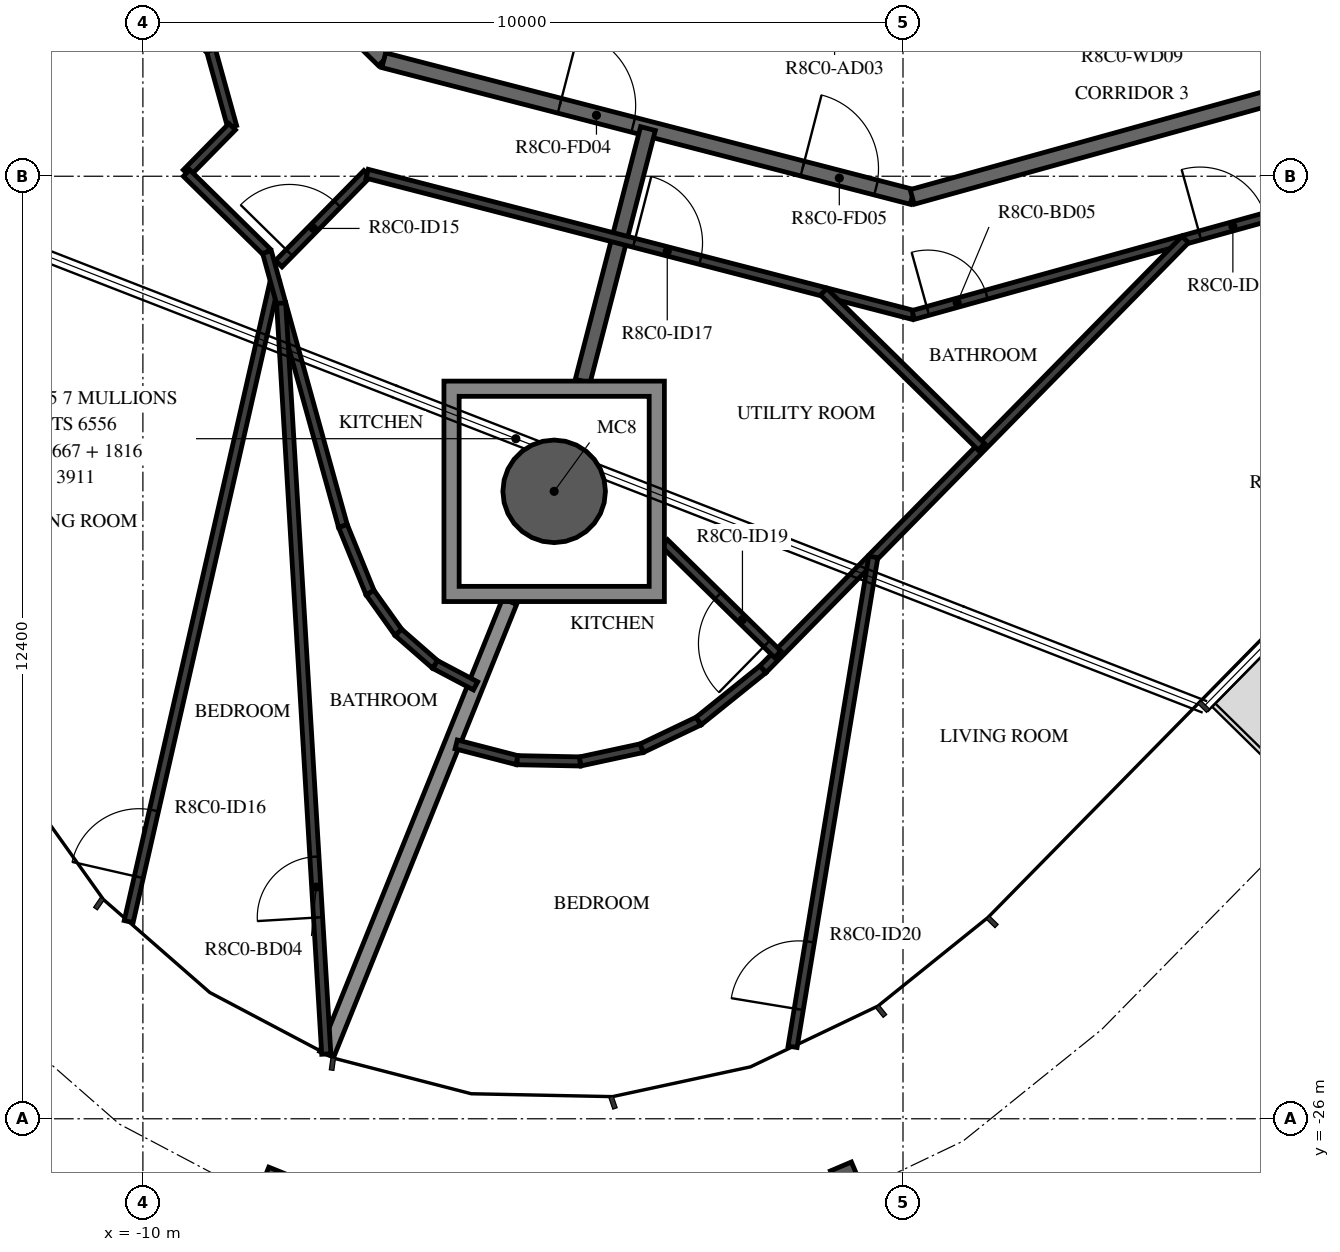
"""IFC4 building model, lengths in metres.
Left out: names, types, materials, properties, quantities, classifications, styles, units other than length and angle.
Written with IfcOpenShell. Run it as: python <this file> out.ifc"""

import sys

from ifc_helpers import new_model, si_unit, direction, frame, frame_2d, origin, origin_2d, place, context, subcontext, project, spatial, polyline, rectangle, hollow_circle, i_section, outline, extrude, element, fill, save


model = new_model("IFC4")
c1 = context("Model", 3, precision=1e-05, world=origin(), true_north=direction((0.0, 1.0)))
c2 = subcontext(c1, "Body", "Model", "MODEL_VIEW")
j1 = project(units=[si_unit("LENGTHUNIT", "METRE"), si_unit("PLANEANGLEUNIT", "RADIAN")], contexts=[c1])
p1 = place(None, origin())
s1 = spatial("IfcSite", under=j1, at=p1, CompositionType="ELEMENT")
p2 = place(p1, origin())
s2 = spatial("IfcBuilding", under=s1, at=p2, CompositionType="ELEMENT")
p3 = place(p2, frame((0.0, 0.0, 319.2)))
s3 = spatial("IfcBuildingStorey", under=s2, at=p3, CompositionType="ELEMENT", Elevation=319.2)
p4 = place(p3, frame((-4.589, -17.745, -0.38), z_axis=(0.0, 0.0, 1.0), x_axis=(1.0, 0.0, 0.0)))
e1 = element("IfcColumn", 1, at=p4, inside=s3, PredefinedType="COLUMN", context=c2, shape_type="SweptSolid", body=[
    extrude(hollow_circle(Radius=0.675, WallThickness=0.03, at=origin_2d()), origin(), (0.0, 0.0, 1.0), 3.5),
])
for number, where, z_axis, x_axis in (
    (2, (-8.373, -27.11, -0.38), (0.0, 0.0, 1.0), (-0.927, 0.375, 0.0)),
    (3, (-0.641, -27.042, -0.38), (0.0, 0.0, 1.0), (-0.92, -0.391, 0.0)),
):
    element("IfcColumn", number, at=place(p3, frame(where, z_axis=z_axis, x_axis=x_axis)), inside=s3, PredefinedType="COLUMN", context=c2, shape_type="SweptSolid", body=[
        extrude(i_section(OverallWidth=0.3, OverallDepth=0.9, WebThickness=0.019, FlangeThickness=0.035, FilletRadius=0.03, at=origin_2d()), origin(), (0.0, 0.0, 1.0), 3.5),
    ])
p5 = place(p3, frame((-11.953, -7.041, 0.0), z_axis=(0.0, 0.0, 1.0), x_axis=(0.713250549143, -0.70090916255, 0.0)))
e4 = element("IfcWall", 4, at=p5, inside=s3, PredefinedType="STANDARD", context=c2, shape_type="SweptSolid", body=[
    extrude(rectangle(XDim=7.181, YDim=0.2, at=frame_2d((3.59, 0.0))), origin(), (0.0, 0.0, 1.0), 3.12),
])
p6 = place(p3, frame((-6.831, -12.074, 0.0), z_axis=(0.0, 0.0, 1.0), x_axis=(0.968144780225, -0.250391063186, 0.0)))
e5 = element("IfcWall", 5, at=p6, inside=s3, PredefinedType="STANDARD", context=c2, shape_type="SweptSolid", body=[
    extrude(rectangle(XDim=7.181, YDim=0.2, at=frame_2d((3.591, 0.0))), origin(), (0.0, 0.0, 1.0), 3.12),
])
p7 = place(p6, frame((2.39, 0.0, 0.0)))
e6 = element("IfcOpeningElement", 6, at=p7, cuts=e5, PredefinedType="OPENING", context=c2, shape_type="SweptSolid", body=[
    extrude(rectangle(XDim=1.0, YDim=2.1, at=frame_2d((0.5, 1.05))), frame((0.0, 0.11, 0.0), z_axis=(0.0, -1.0, 0.0), x_axis=(1.0, 0.0, 0.0)), (0.0, 0.0, 1.0), 0.22),
])
p8 = place(p6, frame((5.69, 0.0, 0.0)))
e7 = element("IfcOpeningElement", 7, at=p8, cuts=e5, PredefinedType="OPENING", context=c2, shape_type="SweptSolid", body=[
    extrude(rectangle(XDim=1.0, YDim=2.1, at=frame_2d((0.5, 1.05))), frame((0.0, 0.11, 0.0), z_axis=(0.0, -1.0, 0.0), x_axis=(1.0, 0.0, 0.0)), (0.0, 0.0, 1.0), 0.22),
])
p9 = place(p3, frame((0.121, -13.872, 0.0), z_axis=(0.0, 0.0, 1.0), x_axis=(0.963625960674, 0.267254575108, 0.0)))
e8 = element("IfcWall", 8, at=p9, inside=s3, PredefinedType="STANDARD", context=c2, shape_type="SweptSolid", body=[
    extrude(rectangle(XDim=7.181, YDim=0.2, at=frame_2d((3.591, 0.0))), origin(), (0.0, 0.0, 1.0), 3.12),
])
p10 = place(p3, frame((-4.214, -16.295, 0.0), z_axis=(0.0, 0.0, 1.0), x_axis=(0.250428810918, 0.968135016752, 0.0)))
e9 = element("IfcWall", 9, at=p10, inside=s3, PredefinedType="STANDARD", context=c2, shape_type="SweptSolid", body=[
    extrude(rectangle(XDim=3.432, YDim=0.2, at=frame_2d((1.716, 0.0))), origin(), (0.0, 0.0, 1.0), 3.12),
])
p11 = place(p3, frame((-7.582, -25.151, 0.0), z_axis=(0.0, 0.0, 1.0), x_axis=(0.374645287615, 0.927168220156, 0.0)))
e10 = element("IfcWall", 10, at=p11, inside=s3, PredefinedType="STANDARD", context=c2, shape_type="SweptSolid", body=[
    extrude(rectangle(XDim=6.423, YDim=0.2, at=frame_2d((3.212, 0.0))), origin(), (0.0, 0.0, 1.0), 2.73),
])
p12 = place(p3, frame((-13.291, -7.829, 0.0), z_axis=(0.0, 0.0, 1.0), x_axis=(0.713255094589, -0.700904537039, 0.0)))
e11 = element("IfcWall", 11, at=p12, inside=s3, PredefinedType="PARTITIONING", context=c2, shape_type="SweptSolid", body=[
    extrude(rectangle(XDim=5.871, YDim=0.12, at=frame_2d((2.936, 0.0))), origin(), (0.0, 0.0, 1.0), 3.12),
])
p13 = place(p12, frame((3.627, 0.0, 0.0)))
e12 = element("IfcOpeningElement", 12, at=p13, cuts=e11, PredefinedType="OPENING", context=c2, shape_type="SweptSolid", body=[
    extrude(rectangle(XDim=0.9, YDim=2.1, at=frame_2d((0.45, 1.05))), frame((0.0, 0.07, 0.0), z_axis=(0.0, -1.0, 0.0), x_axis=(1.0, 0.0, 0.0)), (0.0, 0.0, 1.0), 0.14),
])
p14 = place(p3, frame((-9.104, -11.944, 0.0), z_axis=(0.0, 0.0, 1.0), x_axis=(0.267317596771, -0.963608479859, 0.0)))
e13 = element("IfcWall", 13, at=p14, inside=s3, PredefinedType="PARTITIONING", context=c2, shape_type="SweptSolid", body=[
    extrude(rectangle(XDim=1.042, YDim=0.12, at=frame_2d((0.521, 0.0))), origin(), (0.0, 0.0, 1.0), 3.12),
])
p15 = place(p3, frame((-8.825, -12.948, 0.0), z_axis=(0.0, 0.0, 1.0), x_axis=(-0.700949034431, -0.713211364976, 0.0)))
e14 = element("IfcWall", 14, at=p15, inside=s3, PredefinedType="PARTITIONING", context=c2, shape_type="SweptSolid", body=[
    extrude(rectangle(XDim=0.856, YDim=0.12, at=frame_2d((0.428, 0.0))), origin(), (0.0, 0.0, 1.0), 3.12),
])
p16 = place(p3, frame((-9.425, -13.559, 0.0), z_axis=(0.0, 0.0, 1.0), x_axis=(0.713255540994, -0.700904082768, 0.0)))
e15 = element("IfcWall", 15, at=p16, inside=s3, PredefinedType="PARTITIONING", context=c2, shape_type="SweptSolid", body=[
    extrude(rectangle(XDim=1.482, YDim=0.12, at=frame_2d((0.741, 0.0))), origin(), (0.0, 0.0, 1.0), 3.12),
])
p17 = place(p3, frame((-8.213, -14.75, 0.0), z_axis=(0.0, 0.0, 1.0), x_axis=(0.700899260151, 0.713260280066, 0.0)))
e16 = element("IfcWall", 16, at=p17, inside=s3, PredefinedType="PARTITIONING", context=c2, shape_type="SweptSolid", body=[
    extrude(rectangle(XDim=1.659, YDim=0.12, at=frame_2d((0.83, 0.0))), origin(), (0.0, 0.0, 1.0), 3.12),
])
p18 = place(p17, frame((0.2, 0.0, 0.0)))
e17 = element("IfcOpeningElement", 17, at=p18, cuts=e16, PredefinedType="OPENING", context=c2, shape_type="SweptSolid", body=[
    extrude(rectangle(XDim=0.9, YDim=2.1, at=frame_2d((0.45, 1.05))), frame((0.0, 0.07, 0.0), z_axis=(0.0, -1.0, 0.0), x_axis=(1.0, 0.0, 0.0)), (0.0, 0.0, 1.0), 0.14),
])
p19 = place(p3, frame((-7.05, -13.567, 0.0), z_axis=(0.0, 0.0, 1.0), x_axis=(0.968142373865, -0.250400367264, 0.0)))
e18 = element("IfcWall", 18, at=p19, inside=s3, PredefinedType="PARTITIONING", context=c2, shape_type="SweptSolid", body=[
    extrude(rectangle(XDim=7.421, YDim=0.12, at=frame_2d((3.71, 0.0))), origin(), (0.0, 0.0, 1.0), 3.12),
])
p20 = place(p19, frame((3.628, 0.0, 0.0)))
e19 = element("IfcOpeningElement", 19, at=p20, cuts=e18, PredefinedType="OPENING", context=c2, shape_type="SweptSolid", body=[
    extrude(rectangle(XDim=0.9, YDim=2.1, at=frame_2d((0.45, 1.05))), frame((0.0, 0.07, 0.0), z_axis=(0.0, -1.0, 0.0), x_axis=(1.0, 0.0, 0.0)), (0.0, 0.0, 1.0), 0.14),
])
p21 = place(p3, frame((-14.066, -13.508, 0.0), z_axis=(0.0, 0.0, 1.0), x_axis=(0.700941781432, 0.7132184932, 0.0)))
e20 = element("IfcWall", 20, at=p21, inside=s3, PredefinedType="PARTITIONING", context=c2, shape_type="SweptSolid", body=[
    extrude(rectangle(XDim=4.594, YDim=0.12, at=frame_2d((2.297, 0.0))), origin(), (0.0, 0.0, 1.0), 3.12),
])
p22 = place(p3, frame((-10.187, -23.406, 0.0), z_axis=(0.0, 0.0, 1.0), x_axis=(0.222411648081, 0.974952849526, 0.0)))
e21 = element("IfcWall", 21, at=p22, inside=s3, PredefinedType="PARTITIONING", context=c2, shape_type="SweptSolid", body=[
    extrude(rectangle(XDim=8.649, YDim=0.12, at=frame_2d((4.324, 0.0))), origin(), (0.0, 0.0, 1.0), 3.12),
])
p23 = place(p22, frame((0.6, 0.0, 0.0)))
e22 = element("IfcOpeningElement", 22, at=p23, cuts=e21, PredefinedType="OPENING", context=c2, shape_type="SweptSolid", body=[
    extrude(rectangle(XDim=0.9, YDim=2.1, at=frame_2d((0.45, 1.05))), frame((0.0, 0.07, 0.0), z_axis=(0.0, -1.0, 0.0), x_axis=(1.0, 0.0, 0.0)), (0.0, 0.0, 1.0), 0.14),
])
p24 = place(p3, frame((-7.368, -18.202, 0.0), z_axis=(0.0, 0.0, 1.0), x_axis=(-0.267246564077, 0.963628182438, 0.0)))
e23 = element("IfcWall", 23, at=p24, inside=s3, PredefinedType="PARTITIONING", context=c2, shape_type="SweptSolid", body=[
    extrude(rectangle(XDim=3.74, YDim=0.12, at=frame_2d((1.87, 0.0))), origin(), (0.0, 0.0, 1.0), 3.12),
])
p25 = place(p3, frame((-7.587, -25.148, 0.0), z_axis=(0.0, 0.0, 1.0), x_axis=(-0.060023558623, 0.99819696073, 0.0)))
e24 = element("IfcWall", 24, at=p25, inside=s3, PredefinedType="PARTITIONING", context=c2, shape_type="SweptSolid", body=[
    extrude(rectangle(XDim=9.896, YDim=0.12, at=frame_2d((4.948, 0.0))), origin(), (0.0, 0.0, 1.0), 3.12),
])
p26 = place(p25, frame((1.8, 0.0, 0.0)))
e25 = element("IfcOpeningElement", 25, at=p26, cuts=e24, PredefinedType="OPENING", context=c2, shape_type="SweptSolid", body=[
    extrude(rectangle(XDim=0.8, YDim=2.1, at=frame_2d((0.4, 1.05))), frame((0.0, 0.07, 0.0), z_axis=(0.0, -1.0, 0.0), x_axis=(1.0, 0.0, 0.0)), (0.0, 0.0, 1.0), 0.14),
])
p27 = place(p3, frame((-7.368, -18.202, 0.0), z_axis=(0.0, 0.0, 1.0), x_axis=(0.377296887314, -0.92609235977, 0.0)))
e26 = element("IfcWall", 26, at=p27, inside=s3, PredefinedType="PARTITIONING", context=c2, shape_type="SweptSolid", body=[
    extrude(rectangle(XDim=0.947, YDim=0.12, at=frame_2d((0.473, 0.0))), origin(), (0.0, 0.0, 1.0), 3.12),
])
p28 = place(p3, frame((-7.011, -19.079, 0.0), z_axis=(0.0, 0.0, 1.0), x_axis=(0.580662514246, -0.814144363458, 0.0)))
e27 = element("IfcWall", 27, at=p28, inside=s3, PredefinedType="PARTITIONING", context=c2, shape_type="SweptSolid", body=[
    extrude(rectangle(XDim=0.642, YDim=0.12, at=frame_2d((0.321, 0.0))), origin(), (0.0, 0.0, 1.0), 3.12),
])
p29 = place(p3, frame((-6.638, -19.601, 0.0), z_axis=(0.0, 0.0, 1.0), x_axis=(0.753047703781, -0.657965923001, 0.0)))
e28 = element("IfcWall", 28, at=p29, inside=s3, PredefinedType="PARTITIONING", context=c2, shape_type="SweptSolid", body=[
    extrude(rectangle(XDim=0.642, YDim=0.12, at=frame_2d((0.321, 0.0))), origin(), (0.0, 0.0, 1.0), 3.12),
])
p30 = place(p3, frame((-6.155, -20.024, 0.0), z_axis=(0.0, 0.0, 1.0), x_axis=(0.884133271246, -0.467234800369, 0.0)))
e29 = element("IfcWall", 29, at=p30, inside=s3, PredefinedType="PARTITIONING", context=c2, shape_type="SweptSolid", body=[
    extrude(rectangle(XDim=0.601, YDim=0.12, at=frame_2d((0.301, 0.0))), origin(), (0.0, 0.0, 1.0), 3.12),
])
p31 = place(p3, frame((0.135, -15.425, 0.0), z_axis=(0.0, 0.0, 1.0), x_axis=(0.963633899075, 0.267225950373, 0.0)))
e30 = element("IfcWall", 30, at=p31, inside=s3, PredefinedType="PARTITIONING", context=c2, shape_type="SweptSolid", body=[
    extrude(rectangle(XDim=7.985, YDim=0.12, at=frame_2d((3.992, 0.0))), origin(), (0.0, 0.0, 1.0), 3.12),
])
p32 = place(p31, frame((0.2, 0.0, 0.0)))
e31 = element("IfcOpeningElement", 31, at=p32, cuts=e30, PredefinedType="OPENING", context=c2, shape_type="SweptSolid", body=[
    extrude(rectangle(XDim=0.8, YDim=2.1, at=frame_2d((0.4, 1.05))), frame((0.0, 0.07, 0.0), z_axis=(0.0, -1.0, 0.0), x_axis=(1.0, 0.0, 0.0)), (0.0, 0.0, 1.0), 0.14),
])
p33 = place(p31, frame((3.914, 0.0, 0.0)))
e32 = element("IfcOpeningElement", 32, at=p33, cuts=e30, PredefinedType="OPENING", context=c2, shape_type="SweptSolid", body=[
    extrude(rectangle(XDim=0.9, YDim=2.1, at=frame_2d((0.45, 1.05))), frame((0.0, 0.07, 0.0), z_axis=(0.0, -1.0, 0.0), x_axis=(1.0, 0.0, 0.0)), (0.0, 0.0, 1.0), 0.14),
])
p34 = place(p3, frame((-5.878, -21.075, 0.0), z_axis=(0.0, 0.0, 1.0), x_axis=(0.968171520146, -0.250287649673, 0.0)))
e33 = element("IfcWall", 33, at=p34, inside=s3, PredefinedType="PARTITIONING", context=c2, shape_type="SweptSolid", body=[
    extrude(rectangle(XDim=0.829, YDim=0.12, at=frame_2d((0.415, 0.0))), origin(), (0.0, 0.0, 1.0), 3.12),
])
for number, where, z_axis, x_axis in (
    (34, (-5.076, -21.282, 0.0), (0.0, 0.0, 1.0), (1.0, -0.02, 0.0)),
    (35, (-4.247, -21.299, 0.0), (0.0, 0.0, 1.0), (0.978, 0.211, 0.0)),
):
    element("IfcWall", number, at=place(p3, frame(where, z_axis=z_axis, x_axis=x_axis)), inside=s3, PredefinedType="PARTITIONING", context=c2, shape_type="SweptSolid", body=[
        extrude(rectangle(XDim=0.829, YDim=0.12, at=frame_2d((0.415, 0.0))), origin(), (0.0, 0.0, 1.0), 3.12),
    ])
p35 = place(p3, frame((-3.437, -21.124, 0.0), z_axis=(0.0, 0.0, 1.0), x_axis=(0.902637137035, 0.430402368541, 0.0)))
e36 = element("IfcWall", 36, at=p35, inside=s3, PredefinedType="PARTITIONING", context=c2, shape_type="SweptSolid", body=[
    extrude(rectangle(XDim=0.829, YDim=0.12, at=frame_2d((0.414, 0.0))), origin(), (0.0, 0.0, 1.0), 3.12),
])
p36 = place(p3, frame((-2.689, -20.768, 0.0), z_axis=(0.0, 0.0, 1.0), x_axis=(0.778936756675, 0.627102486919, 0.0)))
e37 = element("IfcWall", 37, at=p36, inside=s3, PredefinedType="PARTITIONING", context=c2, shape_type="SweptSolid", body=[
    extrude(rectangle(XDim=1.087, YDim=0.12, at=frame_2d((0.543, 0.0))), origin(), (0.0, 0.0, 1.0), 3.12),
])
p37 = place(p3, frame((-1.842, -20.086, 0.0), z_axis=(0.0, 0.0, 1.0), x_axis=(0.700919640212, 0.713240252625, 0.0)))
e38 = element("IfcWall", 38, at=p37, inside=s3, PredefinedType="PARTITIONING", context=c2, shape_type="SweptSolid", body=[
    extrude(rectangle(XDim=7.926, YDim=0.12, at=frame_2d((3.963, 0.0))), origin(), (0.0, 0.0, 1.0), 3.12),
])
p38 = place(p3, frame((-1.649, -19.889, 0.0), z_axis=(0.0, 0.0, 1.0), x_axis=(-0.713270858454, 0.700888495041, 0.0)))
e39 = element("IfcWall", 39, at=p38, inside=s3, PredefinedType="PARTITIONING", context=c2, shape_type="SweptSolid", body=[
    extrude(rectangle(XDim=2.09, YDim=0.12, at=frame_2d((1.045, 0.0))), origin(), (0.0, 0.0, 1.0), 3.12),
])
p39 = place(p38, frame((0.2, 0.0, 0.0)))
e40 = element("IfcOpeningElement", 40, at=p39, cuts=e39, PredefinedType="OPENING", context=c2, shape_type="SweptSolid", body=[
    extrude(rectangle(XDim=0.9, YDim=2.1, at=frame_2d((0.45, 1.05))), frame((0.0, 0.07, 0.0), z_axis=(0.0, -1.0, 0.0), x_axis=(1.0, 0.0, 0.0)), (0.0, 0.0, 1.0), 0.14),
])
p40 = place(p3, frame((-1.453, -25.053, 0.0), z_axis=(0.0, 0.0, 1.0), x_axis=(0.162683241952, 0.986678348191, 0.0)))
e41 = element("IfcWall", 41, at=p40, inside=s3, PredefinedType="PARTITIONING", context=c2, shape_type="SweptSolid", body=[
    extrude(rectangle(XDim=6.531, YDim=0.12, at=frame_2d((3.266, 0.0))), origin(), (0.0, 0.0, 1.0), 3.12),
])
p41 = place(p40, frame((0.5, 0.0, 0.0)))
e42 = element("IfcOpeningElement", 42, at=p41, cuts=e41, PredefinedType="OPENING", context=c2, shape_type="SweptSolid", body=[
    extrude(rectangle(XDim=0.9, YDim=2.1, at=frame_2d((0.45, 1.05))), frame((0.0, 0.07, 0.0), z_axis=(0.0, -1.0, 0.0), x_axis=(1.0, 0.0, 0.0)), (0.0, 0.0, 1.0), 0.14),
])
p42 = place(p3, frame((1.032, -17.161, 0.0), z_axis=(0.0, 0.0, 1.0), x_axis=(-0.713201827259, 0.700958738867, 0.0)))
e43 = element("IfcWall", 43, at=p42, inside=s3, PredefinedType="PARTITIONING", context=c2, shape_type="SweptSolid", body=[
    extrude(rectangle(XDim=2.911, YDim=0.12, at=frame_2d((1.456, 0.0))), origin(), (0.0, 0.0, 1.0), 3.12),
])
p43 = place(p3, origin())
e44 = element("IfcWall", 44, at=p43, inside=s3, PredefinedType="STANDARD", context=c2, shape_type="SweptSolid", body=[
    extrude(outline(polyline([(-3.139, -16.295), (-3.139, -19.195), (-6.039, -19.195), (-6.039, -16.295), (-3.139, -16.295)]), holes=[polyline([(-5.839, -18.995), (-3.339, -18.995), (-3.339, -16.495), (-5.839, -16.495), (-5.839, -18.995)])]), origin(), (0.0, 0.0, 1.0), 3.12),
])
p44 = place(p7, origin())
e45 = element("IfcDoor", 45, at=p44, inside=s3, OperationType="SINGLE_SWING_RIGHT", PredefinedType="DOOR", context=c2, shape_type="SweptSolid", body=[
    extrude(rectangle(XDim=1.0, YDim=2.1, at=frame_2d((0.5, 1.05))), frame((0.0, 0.025, 0.0), z_axis=(0.0, -1.0, 0.0), x_axis=(1.0, 0.0, 0.0)), (0.0, 0.0, 1.0), 0.05),
])
fill(e6, e45)
p45 = place(p18, origin())
e46 = element("IfcDoor", 46, at=p45, inside=s3, OperationType="SINGLE_SWING_LEFT", PredefinedType="DOOR", context=c2, shape_type="SweptSolid", body=[
    extrude(rectangle(XDim=0.9, YDim=2.1, at=frame_2d((0.45, 1.05))), frame((0.0, 0.025, 0.0), z_axis=(0.0, -1.0, 0.0), x_axis=(1.0, 0.0, 0.0)), (0.0, 0.0, 1.0), 0.05),
])
fill(e17, e46)
p46 = place(p23, origin())
e47 = element("IfcDoor", 47, at=p46, inside=s3, OperationType="SINGLE_SWING_RIGHT", PredefinedType="DOOR", context=c2, shape_type="SweptSolid", body=[
    extrude(rectangle(XDim=0.9, YDim=2.1, at=frame_2d((0.45, 1.05))), frame((0.0, 0.025, 0.0), z_axis=(0.0, -1.0, 0.0), x_axis=(1.0, 0.0, 0.0)), (0.0, 0.0, 1.0), 0.05),
])
fill(e22, e47)
p47 = place(p26, origin())
e48 = element("IfcDoor", 48, at=p47, inside=s3, OperationType="SINGLE_SWING_RIGHT", PredefinedType="DOOR", context=c2, shape_type="SweptSolid", body=[
    extrude(rectangle(XDim=0.8, YDim=2.1, at=frame_2d((0.4, 1.05))), frame((0.0, 0.025, 0.0), z_axis=(0.0, -1.0, 0.0), x_axis=(1.0, 0.0, 0.0)), (0.0, 0.0, 1.0), 0.05),
])
fill(e25, e48)
p48 = place(p8, origin())
e49 = element("IfcDoor", 49, at=p48, inside=s3, OperationType="SINGLE_SWING_LEFT", PredefinedType="DOOR", context=c2, shape_type="SweptSolid", body=[
    extrude(rectangle(XDim=1.0, YDim=2.1, at=frame_2d((0.5, 1.05))), frame((0.0, 0.025, 0.0), z_axis=(0.0, -1.0, 0.0), x_axis=(1.0, 0.0, 0.0)), (0.0, 0.0, 1.0), 0.05),
])
fill(e7, e49)
p49 = place(p20, origin())
e50 = element("IfcDoor", 50, at=p49, inside=s3, OperationType="SINGLE_SWING_RIGHT", PredefinedType="DOOR", context=c2, shape_type="SweptSolid", body=[
    extrude(rectangle(XDim=0.9, YDim=2.1, at=frame_2d((0.45, 1.05))), frame((0.0, 0.025, 0.0), z_axis=(0.0, -1.0, 0.0), x_axis=(1.0, 0.0, 0.0)), (0.0, 0.0, 1.0), 0.05),
])
fill(e19, e50)
p50 = place(p32, origin())
e51 = element("IfcDoor", 51, at=p50, inside=s3, OperationType="SINGLE_SWING_LEFT", PredefinedType="DOOR", context=c2, shape_type="SweptSolid", body=[
    extrude(rectangle(XDim=0.8, YDim=2.1, at=frame_2d((0.4, 1.05))), frame((0.0, 0.025, 0.0), z_axis=(0.0, -1.0, 0.0), x_axis=(1.0, 0.0, 0.0)), (0.0, 0.0, 1.0), 0.05),
])
fill(e31, e51)
p51 = place(p33, origin())
e52 = element("IfcDoor", 52, at=p51, inside=s3, OperationType="SINGLE_SWING_LEFT", PredefinedType="DOOR", context=c2, shape_type="SweptSolid", body=[
    extrude(rectangle(XDim=0.9, YDim=2.1, at=frame_2d((0.45, 1.05))), frame((0.0, 0.025, 0.0), z_axis=(0.0, -1.0, 0.0), x_axis=(1.0, 0.0, 0.0)), (0.0, 0.0, 1.0), 0.05),
])
fill(e32, e52)
p52 = place(p39, origin())
e53 = element("IfcDoor", 53, at=p52, inside=s3, OperationType="SINGLE_SWING_LEFT", PredefinedType="DOOR", context=c2, shape_type="SweptSolid", body=[
    extrude(rectangle(XDim=0.9, YDim=2.1, at=frame_2d((0.45, 1.05))), frame((0.0, 0.025, 0.0), z_axis=(0.0, -1.0, 0.0), x_axis=(1.0, 0.0, 0.0)), (0.0, 0.0, 1.0), 0.05),
])
fill(e40, e53)
p53 = place(p41, origin())
e54 = element("IfcDoor", 54, at=p53, inside=s3, OperationType="SINGLE_SWING_LEFT", PredefinedType="DOOR", context=c2, shape_type="SweptSolid", body=[
    extrude(rectangle(XDim=0.9, YDim=2.1, at=frame_2d((0.45, 1.05))), frame((0.0, 0.025, 0.0), z_axis=(0.0, -1.0, 0.0), x_axis=(1.0, 0.0, 0.0)), (0.0, 0.0, 1.0), 0.05),
])
fill(e42, e54)
save(model, sys.argv[1])
